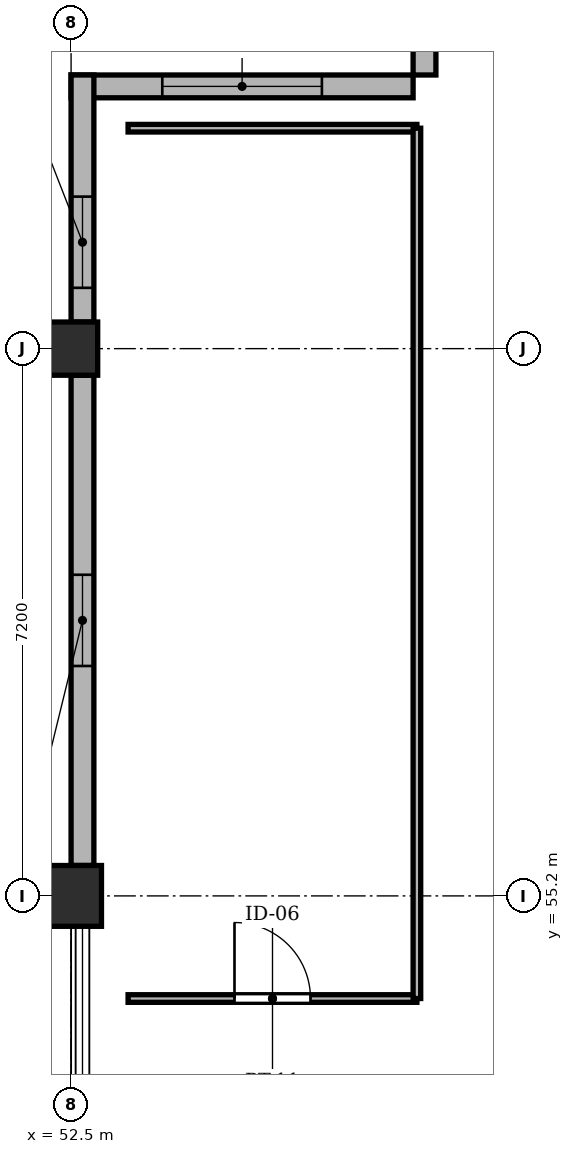
"""IFC4 building model, lengths in metres.
Left out: names, types, materials, properties, quantities, classifications, styles, units other than length and angle.
Written with IfcOpenShell. Run it as: python <this file> out.ifc"""

import sys

from ifc_helpers import new_model, si_unit, direction, frame, frame_2d, origin, origin_2d, place, context, subcontext, project, spatial, rectangle, extrude, element, fill, save


model = new_model("IFC4")
c1 = context("Model", 3, precision=1e-05, world=origin(), true_north=direction((0.0, 1.0)))
c2 = subcontext(c1, "Body", "Model", "MODEL_VIEW")
j1 = project(units=[si_unit("LENGTHUNIT", "METRE"), si_unit("PLANEANGLEUNIT", "RADIAN")], contexts=[c1])
p1 = place(None, origin())
s1 = spatial("IfcSite", under=j1, at=p1, CompositionType="ELEMENT")
p2 = place(p1, origin())
s2 = spatial("IfcBuilding", under=s1, at=p2, CompositionType="ELEMENT")
p3 = place(p2, frame((0.0, 0.0, 53.55)))
s3 = spatial("IfcBuildingStorey", under=s2, at=p3, CompositionType="ELEMENT", Elevation=53.55)
p4 = place(p3, frame((52.5, 55.2, -0.22), z_axis=(0.0, 0.0, 1.0), x_axis=(1.0, 0.0, 0.0)))
e1 = element("IfcColumn", 1, at=p4, inside=s3, PredefinedType="COLUMN", context=c2, shape_type="SweptSolid", body=[
    extrude(rectangle(XDim=0.8, YDim=0.8, at=origin_2d()), origin(), (0.0, 0.0, 1.0), 3.25),
])
p5 = place(p3, frame((52.5, 62.4, -0.22), z_axis=(0.0, 0.0, 1.0), x_axis=(1.0, 0.0, 0.0)))
e2 = element("IfcColumn", 2, at=p5, inside=s3, PredefinedType="COLUMN", context=c2, shape_type="SweptSolid", body=[
    extrude(rectangle(XDim=0.7, YDim=0.7, at=origin_2d()), origin(), (0.0, 0.0, 1.0), 3.25),
])
p6 = place(p3, frame((57.15, 69.6, 0.0), z_axis=(0.0, 0.0, 1.0), x_axis=(0.0, -1.0, 0.0)))
e3 = element("IfcWall", 3, at=p6, inside=s3, PredefinedType="SOLIDWALL", context=c2, shape_type="SweptSolid", body=[
    extrude(rectangle(XDim=3.6, YDim=0.3, at=frame_2d((1.8, 0.0))), origin(), (0.0, 0.0, 1.0), 2.53),
])
p7 = place(p6, frame((1.1, 0.0, 0.62)))
e4 = element("IfcOpeningElement", 4, at=p7, cuts=e3, PredefinedType="OPENING", context=c2, shape_type="SweptSolid", body=[
    extrude(rectangle(XDim=1.4, YDim=1.81, at=frame_2d((0.7, 0.905))), frame((0.0, 0.162, 0.0), z_axis=(0.0, -1.0, 0.0), x_axis=(1.0, 0.0, 0.0)), (0.0, 0.0, 1.0), 0.324),
])
p8 = place(p3, frame((57.0, 65.85, 0.0), z_axis=(0.0, 0.0, 1.0), x_axis=(-1.0, 0.0, 0.0)))
e5 = element("IfcWall", 5, at=p8, inside=s3, PredefinedType="SOLIDWALL", context=c2, shape_type="SweptSolid", body=[
    extrude(rectangle(XDim=4.5, YDim=0.3, at=frame_2d((2.25, 0.0))), origin(), (0.0, 0.0, 1.0), 2.53),
])
p9 = place(p8, frame((1.2, 0.0, 0.62)))
e6 = element("IfcOpeningElement", 6, at=p9, cuts=e5, PredefinedType="OPENING", context=c2, shape_type="SweptSolid", body=[
    extrude(rectangle(XDim=2.1, YDim=1.81, at=frame_2d((1.05, 0.905))), frame((0.0, 0.162, 0.0), z_axis=(0.0, -1.0, 0.0), x_axis=(1.0, 0.0, 0.0)), (0.0, 0.0, 1.0), 0.324),
])
p10 = place(p3, frame((52.65, 66.0, 0.0), z_axis=(0.0, 0.0, 1.0), x_axis=(0.0, -1.0, 0.0)))
e7 = element("IfcWall", 7, at=p10, inside=s3, PredefinedType="SOLIDWALL", context=c2, shape_type="SweptSolid", body=[
    extrude(rectangle(XDim=3.25, YDim=0.3, at=frame_2d((1.625, 0.0))), origin(), (0.0, 0.0, 1.0), 2.53),
])
p11 = place(p10, frame((1.6, 0.0, 0.62)))
e8 = element("IfcOpeningElement", 8, at=p11, cuts=e7, PredefinedType="OPENING", context=c2, shape_type="SweptSolid", body=[
    extrude(rectangle(XDim=1.2, YDim=1.65, at=frame_2d((0.6, 0.825))), frame((0.0, 0.162, 0.0), z_axis=(0.0, -1.0, 0.0), x_axis=(1.0, 0.0, 0.0)), (0.0, 0.0, 1.0), 0.324),
])
p12 = place(p3, frame((52.65, 62.05, 0.0), z_axis=(0.0, 0.0, 1.0), x_axis=(0.0, -1.0, 0.0)))
e9 = element("IfcWall", 9, at=p12, inside=s3, PredefinedType="SOLIDWALL", context=c2, shape_type="SweptSolid", body=[
    extrude(rectangle(XDim=6.45, YDim=0.3, at=frame_2d((3.225, 0.0))), origin(), (0.0, 0.0, 1.0), 2.53),
])
p13 = place(p12, frame((2.625, 0.0, 0.62)))
e10 = element("IfcOpeningElement", 10, at=p13, cuts=e9, PredefinedType="OPENING", context=c2, shape_type="SweptSolid", body=[
    extrude(rectangle(XDim=1.2, YDim=1.7, at=frame_2d((0.6, 0.85))), frame((0.0, 0.162, 0.0), z_axis=(0.0, -1.0, 0.0), x_axis=(1.0, 0.0, 0.0)), (0.0, 0.0, 1.0), 0.324),
])
p14 = place(p3, frame((53.25, 53.85, 0.0), z_axis=(0.0, 0.0, 1.0), x_axis=(1.0, 0.0, 0.0)))
e11 = element("IfcWall", 11, at=p14, inside=s3, PredefinedType="PARTITIONING", context=c2, shape_type="SweptSolid", body=[
    extrude(rectangle(XDim=3.8, YDim=0.1, at=frame_2d((1.9, 0.0))), origin(), (0.0, 0.0, 1.0), 2.53),
])
p15 = place(p14, frame((1.4, 0.0, 0.0)))
e12 = element("IfcOpeningElement", 12, at=p15, cuts=e11, PredefinedType="OPENING", context=c2, shape_type="SweptSolid", body=[
    extrude(rectangle(XDim=1.0, YDim=2.15, at=frame_2d((0.5, 1.075))), frame((0.0, 0.062, 0.0), z_axis=(0.0, -1.0, 0.0), x_axis=(1.0, 0.0, 0.0)), (0.0, 0.0, 1.0), 0.124),
])
p16 = place(p3, frame((53.25, 65.3, 0.0), z_axis=(0.0, 0.0, 1.0), x_axis=(1.0, 0.0, 0.0)))
e13 = element("IfcWall", 13, at=p16, inside=s3, PredefinedType="PARTITIONING", context=c2, shape_type="SweptSolid", body=[
    extrude(rectangle(XDim=3.8, YDim=0.1, at=frame_2d((1.9, 0.0))), origin(), (0.0, 0.0, 1.0), 2.53),
])
p17 = place(p3, frame((57.05, 53.85, 0.0), z_axis=(0.0, 0.0, 1.0), x_axis=(0.0, 1.0, 0.0)))
e14 = element("IfcWall", 14, at=p17, inside=s3, PredefinedType="PARTITIONING", context=c2, shape_type="SweptSolid", body=[
    extrude(rectangle(XDim=11.45, YDim=0.1, at=frame_2d((5.725, 0.0))), origin(), (0.0, 0.0, 1.0), 2.53),
])
p18 = place(p9, origin())
e15 = element("IfcWindow", 15, at=p18, inside=s3, PartitioningType="SINGLE_PANEL", PredefinedType="WINDOW", context=c2, shape_type="SweptSolid", body=[
    extrude(rectangle(XDim=2.1, YDim=1.81, at=frame_2d((1.05, 0.905))), frame((0.0, 0.03, 0.0), z_axis=(0.0, -1.0, 0.0), x_axis=(1.0, 0.0, 0.0)), (0.0, 0.0, 1.0), 0.06),
])
fill(e6, e15)
p19 = place(p11, origin())
e16 = element("IfcWindow", 16, at=p19, inside=s3, PartitioningType="SINGLE_PANEL", PredefinedType="WINDOW", context=c2, shape_type="SweptSolid", body=[
    extrude(rectangle(XDim=1.2, YDim=1.65, at=frame_2d((0.6, 0.825))), frame((0.0, 0.03, 0.0), z_axis=(0.0, -1.0, 0.0), x_axis=(1.0, 0.0, 0.0)), (0.0, 0.0, 1.0), 0.06),
])
fill(e8, e16)
p20 = place(p13, origin())
e17 = element("IfcWindow", 17, at=p20, inside=s3, PartitioningType="SINGLE_PANEL", PredefinedType="WINDOW", context=c2, shape_type="SweptSolid", body=[
    extrude(rectangle(XDim=1.2, YDim=1.7, at=frame_2d((0.6, 0.85))), frame((0.0, 0.03, 0.0), z_axis=(0.0, -1.0, 0.0), x_axis=(1.0, 0.0, 0.0)), (0.0, 0.0, 1.0), 0.06),
])
fill(e10, e17)
p21 = place(p15, origin())
e18 = element("IfcDoor", 18, at=p21, inside=s3, OperationType="SINGLE_SWING_LEFT", PredefinedType="DOOR", context=c2, shape_type="SweptSolid", body=[
    extrude(rectangle(XDim=1.0, YDim=2.15, at=frame_2d((0.5, 1.075))), frame((0.0, 0.025, 0.0), z_axis=(0.0, -1.0, 0.0), x_axis=(1.0, 0.0, 0.0)), (0.0, 0.0, 1.0), 0.05),
])
fill(e12, e18)
save(model, sys.argv[1])
